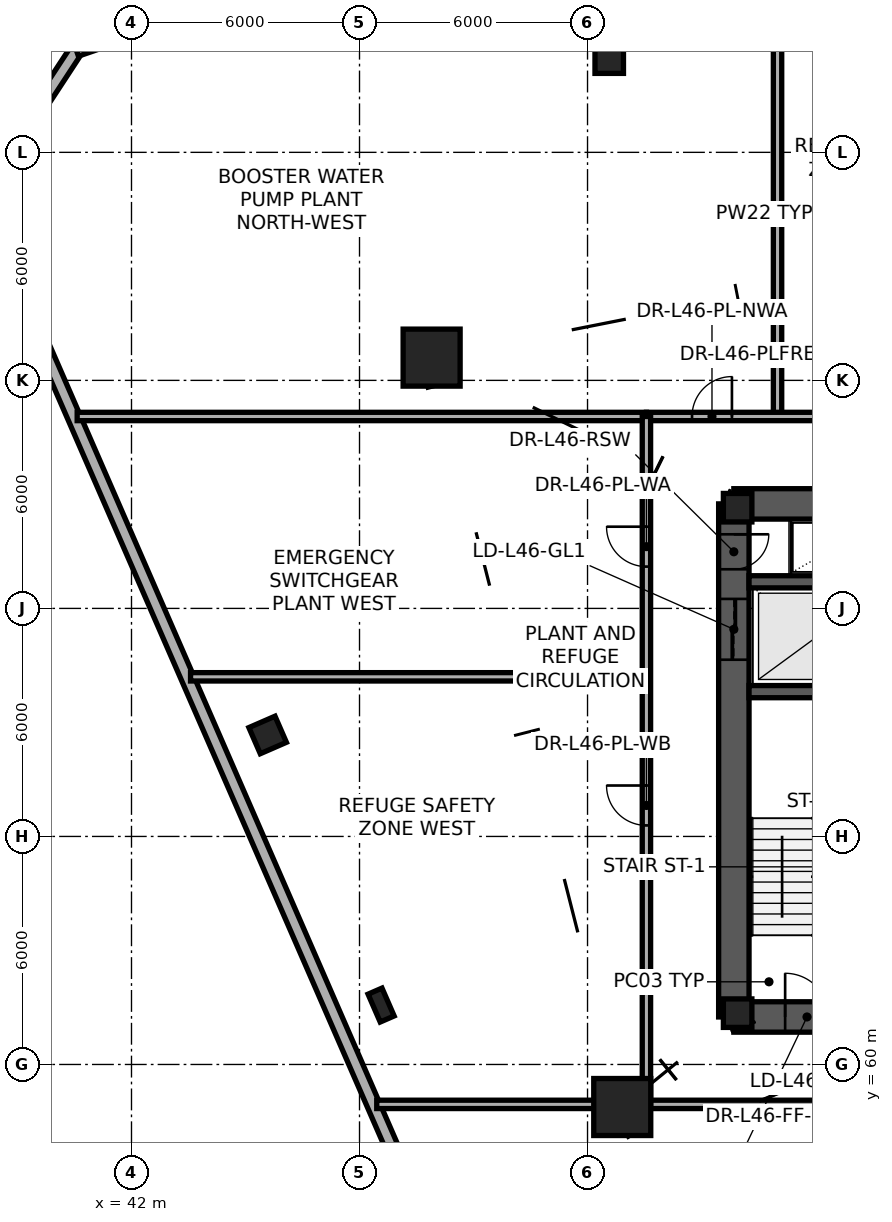
"""IFC4 building model, lengths in metres.
Left out: names, types, materials, properties, quantities, classifications, styles, units other than length and angle.
Written with IfcOpenShell. Run it as: python <this file> out.ifc"""

import sys

from ifc_helpers import new_model, si_unit, direction, frame, frame_2d, origin, origin_2d, place, context, subcontext, project, spatial, rectangle, extrude, element, fill, save


model = new_model("IFC4")
c1 = context("Model", 3, precision=1e-05, world=origin(), true_north=direction((0.0, 1.0)))
c2 = subcontext(c1, "Body", "Model", "MODEL_VIEW")
j1 = project(units=[si_unit("LENGTHUNIT", "METRE"), si_unit("PLANEANGLEUNIT", "RADIAN")], contexts=[c1])
p1 = place(None, origin())
s1 = spatial("IfcSite", under=j1, at=p1, CompositionType="ELEMENT")
p2 = place(p1, origin())
s2 = spatial("IfcBuilding", under=s1, at=p2, CompositionType="ELEMENT")
p3 = place(p2, frame((0.0, 0.0, 175.2)))
s3 = spatial("IfcBuildingStorey", under=s2, at=p3, CompositionType="ELEMENT", Elevation=175.2)
p4 = place(p3, frame((57.85, 61.25, 0.0), z_axis=(0.0, 0.0, 1.0), x_axis=(1.0, 0.0, 0.0)))
e1 = element("IfcWall", 1, at=p4, inside=s3, PredefinedType="SHEAR", context=c2, shape_type="SweptSolid", body=[
    extrude(rectangle(XDim=16.3, YDim=0.8, at=frame_2d((8.15, 0.0))), origin(), (0.0, 0.0, 1.0), 4.2),
])
p5 = place(p4, frame((1.35, 0.0, 0.0)))
e2 = element("IfcOpeningElement", 2, at=p5, cuts=e1, PredefinedType="OPENING", context=c2, shape_type="SweptSolid", body=[
    extrude(rectangle(XDim=1.15, YDim=2.15, at=frame_2d((0.575, 1.075))), frame((0.0, 0.41, 0.0), z_axis=(0.0, -1.0, 0.0), x_axis=(1.0, 0.0, 0.0)), (0.0, 0.0, 1.0), 0.82),
])
p6 = place(p4, frame((6.1, 0.0, 0.0)))
e3 = element("IfcOpeningElement", 3, at=p6, cuts=e1, PredefinedType="OPENING", context=c2, shape_type="SweptSolid", body=[
    extrude(rectangle(XDim=1.6, YDim=2.15, at=frame_2d((0.8, 1.075))), frame((0.0, 0.41, 0.0), z_axis=(0.0, -1.0, 0.0), x_axis=(1.0, 0.0, 0.0)), (0.0, 0.0, 1.0), 0.82),
])
p7 = place(p4, frame((13.55, 0.0, 0.0)))
e4 = element("IfcOpeningElement", 4, at=p7, cuts=e1, PredefinedType="OPENING", context=c2, shape_type="SweptSolid", body=[
    extrude(rectangle(XDim=1.15, YDim=2.15, at=frame_2d((0.575, 1.075))), frame((0.0, 0.41, 0.0), z_axis=(0.0, -1.0, 0.0), x_axis=(1.0, 0.0, 0.0)), (0.0, 0.0, 1.0), 0.82),
])
p8 = place(p3, frame((64.85, 74.75, 0.0), z_axis=(0.0, 0.0, 1.0), x_axis=(-1.0, 0.0, 0.0)))
e5 = element("IfcWall", 5, at=p8, inside=s3, PredefinedType="SHEAR", context=c2, shape_type="SweptSolid", body=[
    extrude(rectangle(XDim=7.0, YDim=0.8, at=frame_2d((3.5, 0.0))), origin(), (0.0, 0.0, 1.0), 4.2),
])
p9 = place(p3, frame((57.85, 74.75, 0.0), z_axis=(0.0, 0.0, 1.0), x_axis=(0.0, -1.0, 0.0)))
e6 = element("IfcWall", 6, at=p9, inside=s3, PredefinedType="SHEAR", context=c2, shape_type="SweptSolid", body=[
    extrude(rectangle(XDim=13.5, YDim=0.8, at=frame_2d((6.75, 0.0))), origin(), (0.0, 0.0, 1.0), 4.2),
])
p10 = place(p9, frame((0.8, 0.0, 0.0)))
e7 = element("IfcOpeningElement", 7, at=p10, cuts=e6, PredefinedType="OPENING", context=c2, shape_type="SweptSolid", body=[
    extrude(rectangle(XDim=0.92, YDim=2.05, at=frame_2d((0.46, 1.025))), frame((0.0, 0.41, 0.0), z_axis=(0.0, -1.0, 0.0), x_axis=(1.0, 0.0, 0.0)), (0.0, 0.0, 1.0), 0.82),
])
p11 = place(p9, frame((2.5, 0.0, 0.0)))
e8 = element("IfcOpeningElement", 8, at=p11, cuts=e6, PredefinedType="OPENING", context=c2, shape_type="SweptSolid", body=[
    extrude(rectangle(XDim=1.6, YDim=2.3, at=frame_2d((0.8, 1.15))), frame((0.0, 0.41, 0.0), z_axis=(0.0, -1.0, 0.0), x_axis=(1.0, 0.0, 0.0)), (0.0, 0.0, 1.0), 0.82),
])
for number, where, z_axis, x_axis in (
    (9, (58.25, 69.81, 0.0), (0.0, 0.0, 1.0), (1.0, 0.0, 0.0)),
    (10, (58.25, 72.7, 0.0), (0.0, 0.0, 1.0), (1.0, 0.0, 0.0)),
):
    element("IfcWall", number, at=place(p3, frame(where, z_axis=z_axis, x_axis=x_axis)), inside=s3, PredefinedType="SHEAR", context=c2, shape_type="SweptSolid", body=[
        extrude(rectangle(XDim=3.84, YDim=0.32, at=frame_2d((1.92, 0.0))), origin(), (0.0, 0.0, 1.0), 4.2),
    ])
for number, where, z_axis, x_axis in (
    (11, (57.95, 61.35, 0.0), (0.0, 0.0, 1.0), (1.0, 0.0, 0.0)),
    (12, (57.95, 74.65, 0.0), (0.0, 0.0, 1.0), (1.0, 0.0, 0.0)),
):
    element("IfcColumn", number, at=place(p3, frame(where, z_axis=z_axis, x_axis=x_axis)), inside=s3, PredefinedType="COLUMN", context=c2, shape_type="SweptSolid", body=[
        extrude(rectangle(XDim=0.75, YDim=0.75, at=origin_2d()), origin(), (0.0, 0.0, 1.0), 4.2),
    ])
for number, where, z_axis, x_axis in (
    (13, (49.898, 78.599, 0.0), (0.0, 0.0, 1.0), (1.0, 0.0, 0.0)),
    (14, (54.914, 58.88, 0.0), (0.0, 0.0, 1.0), (1.0, 0.0, 0.0)),
):
    element("IfcColumn", number, at=place(p3, frame(where, z_axis=z_axis, x_axis=x_axis)), inside=s3, PredefinedType="COLUMN", context=c2, shape_type="SweptSolid", body=[
        extrude(rectangle(XDim=1.5, YDim=1.5, at=origin_2d()), origin(), (0.0, 0.0, 1.0), 4.2),
    ])
p12 = place(p3, frame((54.522, 86.513, 0.003), z_axis=(0.023384322481, -0.029143148167, 0.999301681364), x_axis=(-0.779956681152, -0.625833504637, 0.0)))
e15 = element("IfcColumn", 15, at=p12, inside=s3, PredefinedType="COLUMN", context=c2, shape_type="SweptSolid", body=[
    extrude(rectangle(XDim=0.75, YDim=0.75, at=origin_2d()), origin(), (0.0, 0.0, 1.0), 4.197),
])
p13 = place(p3, frame((45.511, 68.681, 0.003), z_axis=(0.034091169757, -0.004944964896, 0.999406493608), x_axis=(0.964125940683, 0.263559565569, -0.031583633399)))
e16 = element("IfcColumn", 16, at=p13, inside=s3, PredefinedType="COLUMN", context=c2, shape_type="SweptSolid", body=[
    extrude(rectangle(XDim=0.75, YDim=0.75, at=origin_2d()), origin(), (0.0, 0.0, 1.0), 4.197),
])
p14 = place(p3, frame((48.51, 61.544, 0.003), z_axis=(0.027812729402, 0.009193328966, 0.999570875319), x_axis=(0.744858205802, 0.666682045545, -0.026857092122)))
e17 = element("IfcColumn", 17, at=p14, inside=s3, PredefinedType="PILASTER", context=c2, shape_type="SweptSolid", body=[
    extrude(rectangle(XDim=0.8, YDim=0.4, at=origin_2d()), origin(), (0.0, 0.0, 1.0), 4.196),
])
p15 = place(p3, frame((61.232, 29.396, 0.0), z_axis=(0.0, 0.0, 1.0), x_axis=(-0.399299124271, 0.916820707312, 0.0)))
e18 = element("IfcWall", 18, at=p15, inside=s3, PredefinedType="STANDARD", context=c2, shape_type="SweptSolid", body=[
    extrude(rectangle(XDim=55.751, YDim=0.34, at=frame_2d((27.876, 0.0))), origin(), (0.0, 0.0, 1.0), 0.85),
])
p16 = place(p3, frame((38.7, 83.871, 0.0), z_axis=(0.0, 0.0, 1.0), x_axis=(0.548083892996, 0.836423365431, 0.0)))
e19 = element("IfcWall", 19, at=p16, inside=s3, PredefinedType="STANDARD", context=c2, shape_type="SweptSolid", body=[
    extrude(rectangle(XDim=3.373, YDim=0.34, at=frame_2d((1.686, 0.0))), origin(), (0.0, 0.0, 1.0), 3.95),
])
p17 = place(p3, frame((40.548, 86.692, 0.0), z_axis=(0.0, 0.0, 1.0), x_axis=(0.94595609767, 0.324294713618, 0.0)))
e20 = element("IfcWall", 20, at=p17, inside=s3, PredefinedType="STANDARD", context=c2, shape_type="SweptSolid", body=[
    extrude(rectangle(XDim=3.373, YDim=0.34, at=frame_2d((1.687, 0.0))), origin(), (0.0, 0.0, 1.0), 3.95),
])
p18 = place(p3, frame((59.0, 77.05, 0.0), z_axis=(0.0, 0.0, 1.0), x_axis=(0.0, 1.0, 0.0)))
e21 = element("IfcWall", 21, at=p18, inside=s3, PredefinedType="PARTITIONING", context=c2, shape_type="SweptSolid", body=[
    extrude(rectangle(XDim=10.651, YDim=0.22, at=frame_2d((5.325, 0.0))), origin(), (0.0, 0.0, 1.0), 3.15),
])
p19 = place(p3, frame((40.57, 77.05, 0.0), z_axis=(0.0, 0.0, 1.0), x_axis=(1.0, 0.0, 0.0)))
e22 = element("IfcWall", 22, at=p19, inside=s3, PredefinedType="PARTITIONING", context=c2, shape_type="SweptSolid", body=[
    extrude(rectangle(XDim=14.98, YDim=0.22, at=frame_2d((7.49, 0.0))), origin(), (0.0, 0.0, 1.0), 3.15),
])
p20 = place(p3, frame((43.554, 70.2, 0.0), z_axis=(0.0, 0.0, 1.0), x_axis=(1.0, 0.0, 0.0)))
e23 = element("IfcWall", 23, at=p20, inside=s3, PredefinedType="PARTITIONING", context=c2, shape_type="SweptSolid", body=[
    extrude(rectangle(XDim=11.996, YDim=0.22, at=frame_2d((5.998, 0.0))), origin(), (0.0, 0.0, 1.0), 3.15),
])
p21 = place(p3, frame((48.453, 58.95, 0.0), z_axis=(0.0, 0.0, 1.0), x_axis=(1.0, 0.0, 0.0)))
e24 = element("IfcWall", 24, at=p21, inside=s3, PredefinedType="PARTITIONING", context=c2, shape_type="SweptSolid", body=[
    extrude(rectangle(XDim=7.097, YDim=0.22, at=frame_2d((3.548, 0.0))), origin(), (0.0, 0.0, 1.0), 3.15),
])
p22 = place(p3, frame((55.55, 58.95, 0.0), z_axis=(0.0, 0.0, 1.0), x_axis=(1.0, 0.0, 0.0)))
e25 = element("IfcWall", 25, at=p22, inside=s3, PredefinedType="PARTITIONING", context=c2, shape_type="SweptSolid", body=[
    extrude(rectangle(XDim=20.9, YDim=0.22, at=frame_2d((10.45, 0.0))), origin(), (0.0, 0.0, 1.0), 3.33),
])
p23 = place(p22, frame((9.7, 0.0, 0.0)))
e26 = element("IfcOpeningElement", 26, at=p23, cuts=e25, PredefinedType="OPENING", context=c2, shape_type="SweptSolid", body=[
    extrude(rectangle(XDim=1.5, YDim=2.2, at=frame_2d((0.75, 1.1))), frame((0.0, 0.12, 0.0), z_axis=(0.0, -1.0, 0.0), x_axis=(1.0, 0.0, 0.0)), (0.0, 0.0, 1.0), 0.24),
])
p24 = place(p3, frame((55.55, 77.05, 0.0), z_axis=(0.0, 0.0, 1.0), x_axis=(1.0, 0.0, 0.0)))
e27 = element("IfcWall", 27, at=p24, inside=s3, PredefinedType="PARTITIONING", context=c2, shape_type="SweptSolid", body=[
    extrude(rectangle(XDim=20.9, YDim=0.22, at=frame_2d((10.45, 0.0))), origin(), (0.0, 0.0, 1.0), 3.33),
])
p25 = place(p24, frame((1.2, 0.0, 0.0)))
e28 = element("IfcOpeningElement", 28, at=p25, cuts=e27, PredefinedType="OPENING", context=c2, shape_type="SweptSolid", body=[
    extrude(rectangle(XDim=1.05, YDim=2.15, at=frame_2d((0.525, 1.075))), frame((0.0, 0.12, 0.0), z_axis=(0.0, -1.0, 0.0), x_axis=(1.0, 0.0, 0.0)), (0.0, 0.0, 1.0), 0.24),
])
p26 = place(p24, frame((6.425, 0.0, 0.0)))
e29 = element("IfcOpeningElement", 29, at=p26, cuts=e27, PredefinedType="OPENING", context=c2, shape_type="SweptSolid", body=[
    extrude(rectangle(XDim=1.05, YDim=2.15, at=frame_2d((0.525, 1.075))), frame((0.0, 0.12, 0.0), z_axis=(0.0, -1.0, 0.0), x_axis=(1.0, 0.0, 0.0)), (0.0, 0.0, 1.0), 0.24),
])
p27 = place(p24, frame((11.702, 0.0, 0.0)))
e30 = element("IfcOpeningElement", 30, at=p27, cuts=e27, PredefinedType="OPENING", context=c2, shape_type="SweptSolid", body=[
    extrude(rectangle(XDim=1.05, YDim=2.15, at=frame_2d((0.525, 1.075))), frame((0.0, 0.12, 0.0), z_axis=(0.0, -1.0, 0.0), x_axis=(1.0, 0.0, 0.0)), (0.0, 0.0, 1.0), 0.24),
])
p28 = place(p24, frame((18.75, 0.0, 0.0)))
e31 = element("IfcOpeningElement", 31, at=p28, cuts=e27, PredefinedType="OPENING", context=c2, shape_type="SweptSolid", body=[
    extrude(rectangle(XDim=1.05, YDim=2.15, at=frame_2d((0.525, 1.075))), frame((0.0, 0.12, 0.0), z_axis=(0.0, -1.0, 0.0), x_axis=(1.0, 0.0, 0.0)), (0.0, 0.0, 1.0), 0.24),
])
p29 = place(p3, frame((55.55, 58.95, 0.0), z_axis=(0.0, 0.0, 1.0), x_axis=(0.0, 1.0, 0.0)))
e32 = element("IfcWall", 32, at=p29, inside=s3, PredefinedType="PARTITIONING", context=c2, shape_type="SweptSolid", body=[
    extrude(rectangle(XDim=18.1, YDim=0.22, at=frame_2d((9.05, 0.0))), origin(), (0.0, 0.0, 1.0), 3.33),
])
p30 = place(p29, frame((7.34, 0.0, 0.0)))
e33 = element("IfcOpeningElement", 33, at=p30, cuts=e32, PredefinedType="OPENING", context=c2, shape_type="SweptSolid", body=[
    extrude(rectangle(XDim=1.05, YDim=2.15, at=frame_2d((0.525, 1.075))), frame((0.0, 0.12, 0.0), z_axis=(0.0, -1.0, 0.0), x_axis=(1.0, 0.0, 0.0)), (0.0, 0.0, 1.0), 0.24),
])
p31 = place(p29, frame((14.15, 0.0, 0.0)))
e34 = element("IfcOpeningElement", 34, at=p31, cuts=e32, PredefinedType="OPENING", context=c2, shape_type="SweptSolid", body=[
    extrude(rectangle(XDim=1.05, YDim=2.15, at=frame_2d((0.525, 1.075))), frame((0.0, 0.12, 0.0), z_axis=(0.0, -1.0, 0.0), x_axis=(1.0, 0.0, 0.0)), (0.0, 0.0, 1.0), 0.24),
])
p32 = place(p5, origin())
e35 = element("IfcDoor", 35, at=p32, inside=s3, OperationType="SINGLE_SWING_LEFT", PredefinedType="DOOR", context=c2, shape_type="SweptSolid", body=[
    extrude(rectangle(XDim=1.15, YDim=2.15, at=frame_2d((0.575, 1.075))), frame((0.0, 0.025, 0.0), z_axis=(0.0, -1.0, 0.0), x_axis=(1.0, 0.0, 0.0)), (0.0, 0.0, 1.0), 0.05),
])
fill(e2, e35)
p33 = place(p10, origin())
e36 = element("IfcDoor", 36, at=p33, inside=s3, OperationType="SINGLE_SWING_LEFT", PredefinedType="DOOR", context=c2, shape_type="SweptSolid", body=[
    extrude(rectangle(XDim=0.92, YDim=2.05, at=frame_2d((0.46, 1.025))), frame((0.0, 0.025, 0.0), z_axis=(0.0, -1.0, 0.0), x_axis=(1.0, 0.0, 0.0)), (0.0, 0.0, 1.0), 0.05),
])
fill(e7, e36)
p34 = place(p11, origin())
e37 = element("IfcDoor", 37, at=p34, inside=s3, OperationType="DOUBLE_DOOR_SLIDING", PredefinedType="DOOR", context=c2, shape_type="SweptSolid", body=[
    extrude(rectangle(XDim=1.6, YDim=2.3, at=frame_2d((0.8, 1.15))), frame((0.0, 0.025, 0.0), z_axis=(0.0, -1.0, 0.0), x_axis=(1.0, 0.0, 0.0)), (0.0, 0.0, 1.0), 0.05),
])
fill(e8, e37)
p35 = place(p25, origin())
e38 = element("IfcDoor", 38, at=p35, inside=s3, OperationType="SINGLE_SWING_RIGHT", PredefinedType="DOOR", context=c2, shape_type="SweptSolid", body=[
    extrude(rectangle(XDim=1.05, YDim=2.15, at=frame_2d((0.525, 1.075))), frame((0.0, 0.025, 0.0), z_axis=(0.0, -1.0, 0.0), x_axis=(1.0, 0.0, 0.0)), (0.0, 0.0, 1.0), 0.05),
])
fill(e28, e38)
p36 = place(p30, origin())
e39 = element("IfcDoor", 39, at=p36, inside=s3, OperationType="SINGLE_SWING_RIGHT", PredefinedType="DOOR", context=c2, shape_type="SweptSolid", body=[
    extrude(rectangle(XDim=1.05, YDim=2.15, at=frame_2d((0.525, 1.075))), frame((0.0, 0.025, 0.0), z_axis=(0.0, -1.0, 0.0), x_axis=(1.0, 0.0, 0.0)), (0.0, 0.0, 1.0), 0.05),
])
fill(e33, e39)
p37 = place(p31, origin())
e40 = element("IfcDoor", 40, at=p37, inside=s3, OperationType="SINGLE_SWING_RIGHT", PredefinedType="DOOR", context=c2, shape_type="SweptSolid", body=[
    extrude(rectangle(XDim=1.05, YDim=2.15, at=frame_2d((0.525, 1.075))), frame((0.0, 0.025, 0.0), z_axis=(0.0, -1.0, 0.0), x_axis=(1.0, 0.0, 0.0)), (0.0, 0.0, 1.0), 0.05),
])
fill(e34, e40)
save(model, sys.argv[1])
